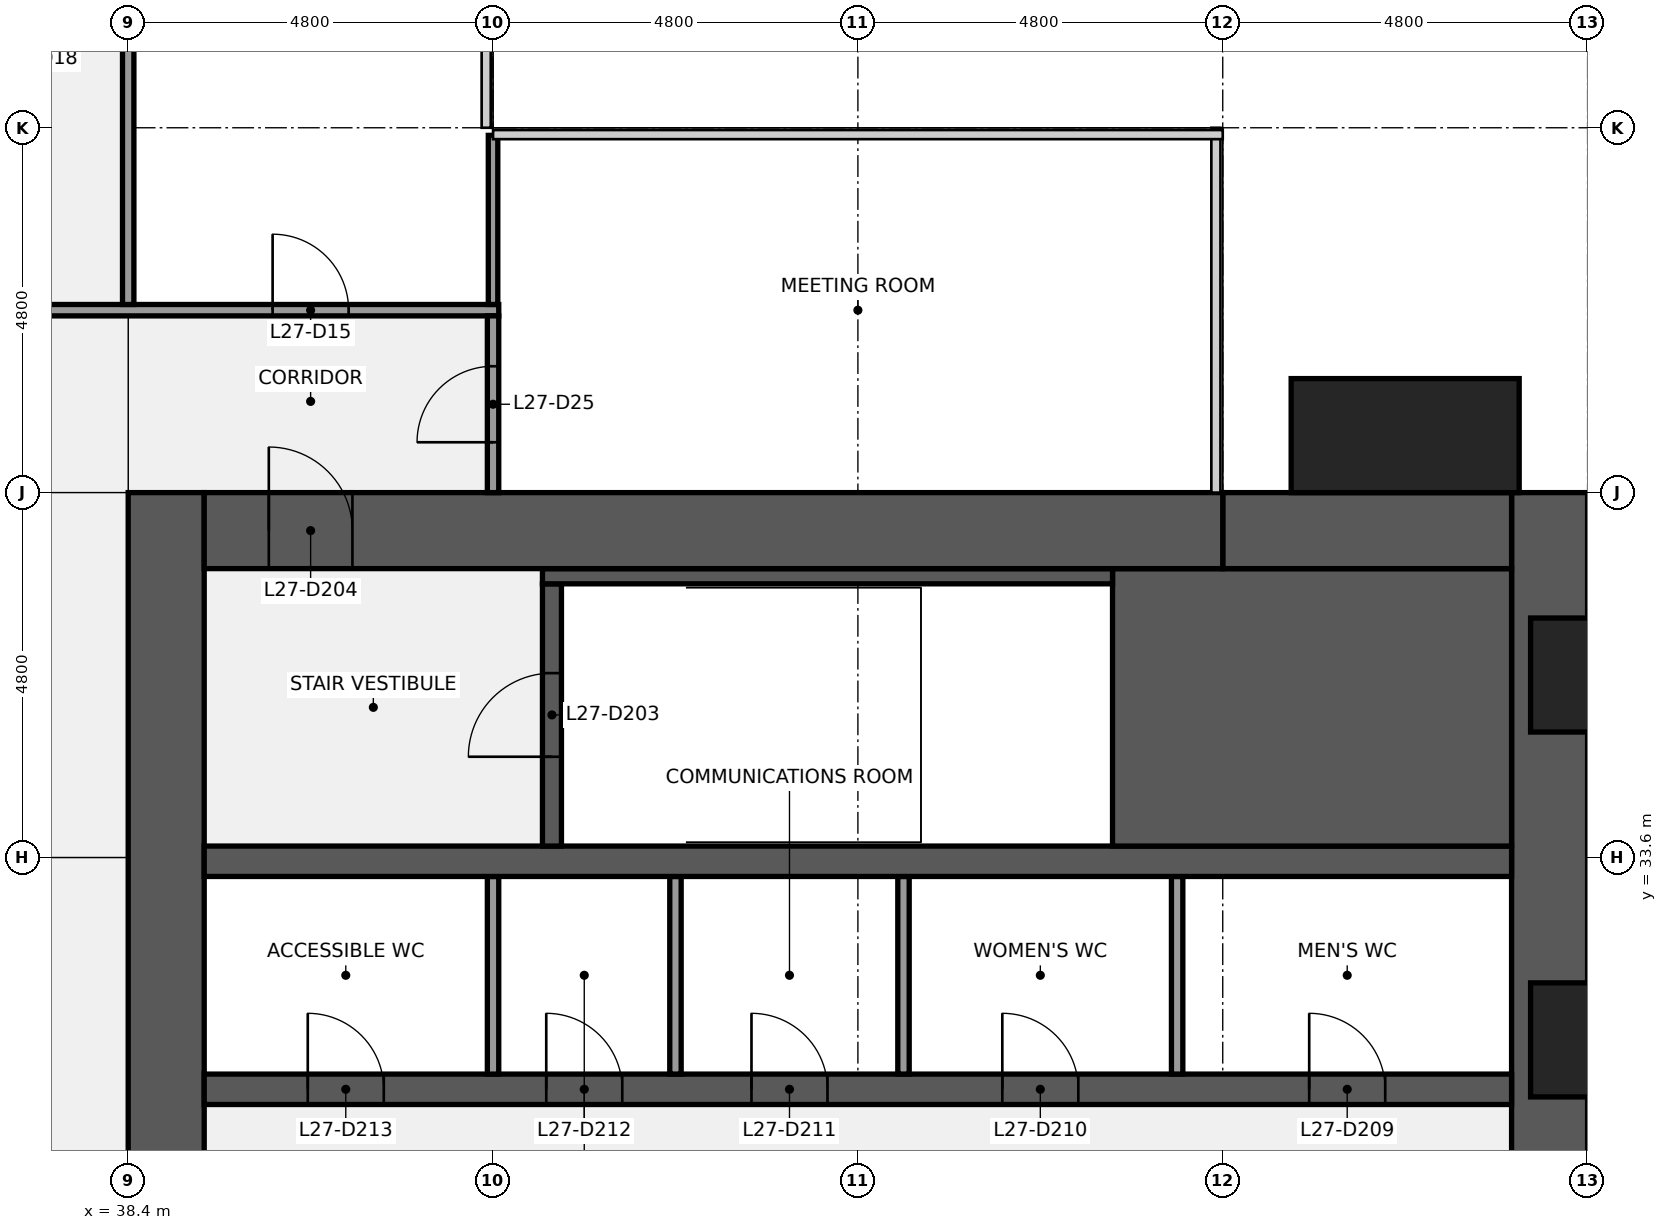
"""IFC4 building model, lengths in metres.
Left out: names, types, materials, properties, quantities, classifications, styles, units other than length and angle.
Written with IfcOpenShell. Run it as: python <this file> out.ifc"""

import sys

from ifc_helpers import new_model, si_unit, direction, frame, frame_2d, origin, origin_2d, place, context, subcontext, project, spatial, rectangle, extrude, element, fill, save


model = new_model("IFC4")
c1 = context("Model", 3, precision=1e-05, world=origin(), true_north=direction((0.0, 1.0)))
c2 = subcontext(c1, "Body", "Model", "MODEL_VIEW")
j1 = project(units=[si_unit("LENGTHUNIT", "METRE"), si_unit("PLANEANGLEUNIT", "RADIAN")], contexts=[c1])
p1 = place(None, origin())
s1 = spatial("IfcSite", under=j1, at=p1, CompositionType="ELEMENT")
p2 = place(p1, origin())
s2 = spatial("IfcBuilding", under=s1, at=p2, CompositionType="ELEMENT")
p3 = place(p2, frame((0.0, 0.0, 128.1)))
s3 = spatial("IfcBuildingStorey", under=s2, at=p3, CompositionType="ELEMENT", Elevation=128.1)
p4 = place(p3, frame((57.1, 38.4, 0.0), z_axis=(0.0, 0.0, 1.0), x_axis=(0.0, -1.0, 0.0)))
e1 = element("IfcWall", 1, at=p4, inside=s3, PredefinedType="SHEAR", context=c2, shape_type="SweptSolid", body=[
    extrude(rectangle(XDim=28.8, YDim=1.0, at=frame_2d((14.4, 0.0))), origin(), (0.0, 0.0, 1.0), 3.84),
])
p5 = place(p4, frame((18.45, 0.0, 0.9)))
e2 = element("IfcOpeningElement", 2, at=p5, cuts=e1, PredefinedType="OPENING", context=c2, shape_type="SweptSolid", body=[
    extrude(rectangle(XDim=1.5, YDim=1.5, at=frame_2d((0.75, 0.75))), frame((0.0, 0.51, 0.0), z_axis=(0.0, -1.0, 0.0), x_axis=(1.0, 0.0, 0.0)), (0.0, 0.0, 1.0), 1.02),
])
p6 = place(p4, frame((8.85, 0.0, 0.9)))
e3 = element("IfcOpeningElement", 3, at=p6, cuts=e1, PredefinedType="OPENING", context=c2, shape_type="SweptSolid", body=[
    extrude(rectangle(XDim=1.5, YDim=1.5, at=frame_2d((0.75, 0.75))), frame((0.0, 0.51, 0.0), z_axis=(0.0, -1.0, 0.0), x_axis=(1.0, 0.0, 0.0)), (0.0, 0.0, 1.0), 1.02),
])
p7 = place(p3, frame((38.9, 9.6, 0.0), z_axis=(0.0, 0.0, 1.0), x_axis=(0.0, 1.0, 0.0)))
e4 = element("IfcWall", 4, at=p7, inside=s3, PredefinedType="SHEAR", context=c2, shape_type="SweptSolid", body=[
    extrude(rectangle(XDim=28.8, YDim=1.0, at=frame_2d((14.4, 0.0))), origin(), (0.0, 0.0, 1.0), 3.84),
])
p8 = place(p7, frame((8.7, 0.0, 0.0)))
e5 = element("IfcOpeningElement", 5, at=p8, cuts=e4, PredefinedType="OPENING", context=c2, shape_type="SweptSolid", body=[
    extrude(rectangle(XDim=1.8, YDim=2.1, at=frame_2d((0.9, 1.05))), frame((0.0, 0.51, 0.0), z_axis=(0.0, -1.0, 0.0), x_axis=(1.0, 0.0, 0.0)), (0.0, 0.0, 1.0), 1.02),
])
p9 = place(p7, frame((18.3, 0.0, 0.0)))
e6 = element("IfcOpeningElement", 6, at=p9, cuts=e4, PredefinedType="OPENING", context=c2, shape_type="SweptSolid", body=[
    extrude(rectangle(XDim=1.8, YDim=2.1, at=frame_2d((0.9, 1.05))), frame((0.0, 0.51, 0.0), z_axis=(0.0, -1.0, 0.0), x_axis=(1.0, 0.0, 0.0)), (0.0, 0.0, 1.0), 1.02),
])
p10 = place(p3, frame((39.4, 30.55, 0.0), z_axis=(0.0, 0.0, 1.0), x_axis=(1.0, 0.0, 0.0)))
e7 = element("IfcWall", 7, at=p10, inside=s3, PredefinedType="SHEAR", context=c2, shape_type="SweptSolid", body=[
    extrude(rectangle(XDim=17.2, YDim=0.4, at=frame_2d((8.6, 0.0))), origin(), (0.0, 0.0, 1.0), 3.84),
])
p11 = place(p10, frame((14.538, 0.0, 0.0)))
e8 = element("IfcOpeningElement", 8, at=p11, cuts=e7, PredefinedType="OPENING", context=c2, shape_type="SweptSolid", body=[
    extrude(rectangle(XDim=1.0, YDim=2.1, at=frame_2d((0.5, 1.05))), frame((0.0, 0.21, 0.0), z_axis=(0.0, -1.0, 0.0), x_axis=(1.0, 0.0, 0.0)), (0.0, 0.0, 1.0), 0.42),
])
p12 = place(p10, frame((10.5, 0.0, 0.0)))
e9 = element("IfcOpeningElement", 9, at=p12, cuts=e7, PredefinedType="OPENING", context=c2, shape_type="SweptSolid", body=[
    extrude(rectangle(XDim=1.0, YDim=2.1, at=frame_2d((0.5, 1.05))), frame((0.0, 0.21, 0.0), z_axis=(0.0, -1.0, 0.0), x_axis=(1.0, 0.0, 0.0)), (0.0, 0.0, 1.0), 0.42),
])
p13 = place(p10, frame((7.2, 0.0, 0.0)))
e10 = element("IfcOpeningElement", 10, at=p13, cuts=e7, PredefinedType="OPENING", context=c2, shape_type="SweptSolid", body=[
    extrude(rectangle(XDim=1.0, YDim=2.1, at=frame_2d((0.5, 1.05))), frame((0.0, 0.21, 0.0), z_axis=(0.0, -1.0, 0.0), x_axis=(1.0, 0.0, 0.0)), (0.0, 0.0, 1.0), 0.42),
])
p14 = place(p10, frame((4.5, 0.0, 0.0)))
e11 = element("IfcOpeningElement", 11, at=p14, cuts=e7, PredefinedType="OPENING", context=c2, shape_type="SweptSolid", body=[
    extrude(rectangle(XDim=1.0, YDim=2.1, at=frame_2d((0.5, 1.05))), frame((0.0, 0.21, 0.0), z_axis=(0.0, -1.0, 0.0), x_axis=(1.0, 0.0, 0.0)), (0.0, 0.0, 1.0), 0.42),
])
p15 = place(p10, frame((1.363, 0.0, 0.0)))
e12 = element("IfcOpeningElement", 12, at=p15, cuts=e7, PredefinedType="OPENING", context=c2, shape_type="SweptSolid", body=[
    extrude(rectangle(XDim=1.0, YDim=2.1, at=frame_2d((0.5, 1.05))), frame((0.0, 0.21, 0.0), z_axis=(0.0, -1.0, 0.0), x_axis=(1.0, 0.0, 0.0)), (0.0, 0.0, 1.0), 0.42),
])
for number, where, z_axis, x_axis in (
    (13, (52.2, 30.75, 0.0), (0.0, 0.0, 1.0), (0.0, 1.0, 0.0)),
    (14, (48.6, 30.75, 0.0), (0.0, 0.0, 1.0), (0.0, 1.0, 0.0)),
    (15, (45.6, 30.75, 0.0), (0.0, 0.0, 1.0), (0.0, 1.0, 0.0)),
    (16, (43.2, 30.75, 0.0), (0.0, 0.0, 1.0), (0.0, 1.0, 0.0)),
):
    element("IfcWall", number, at=place(p3, frame(where, z_axis=z_axis, x_axis=x_axis)), inside=s3, PredefinedType="PARTITIONING", context=c2, shape_type="SweptSolid", body=[
        extrude(rectangle(XDim=2.6, YDim=0.15, at=frame_2d((1.3, 0.0))), origin(), (0.0, 0.0, 1.0), 3.84),
    ])
p16 = place(p3, frame((39.4, 33.55, 0.0), z_axis=(0.0, 0.0, 1.0), x_axis=(1.0, 0.0, 0.0)))
e17 = element("IfcWall", 17, at=p16, inside=s3, PredefinedType="SHEAR", context=c2, shape_type="SweptSolid", body=[
    extrude(rectangle(XDim=17.2, YDim=0.4, at=frame_2d((8.6, 0.0))), origin(), (0.0, 0.0, 1.0), 3.84),
])
p17 = place(p3, frame((51.35, 35.575, 0.0), z_axis=(0.0, 0.0, 1.0), x_axis=(1.0, 0.0, 0.0)))
e18 = element("IfcWall", 18, at=p17, inside=s3, PredefinedType="SHEAR", context=c2, shape_type="SweptSolid", body=[
    extrude(rectangle(XDim=5.25, YDim=3.65, at=frame_2d((2.625, 0.0))), origin(), (0.0, 0.0, 1.0), 3.84),
])
p18 = place(p3, frame((43.975, 33.75, 0.0), z_axis=(0.0, 0.0, 1.0), x_axis=(0.0, 1.0, 0.0)))
e19 = element("IfcWall", 19, at=p18, inside=s3, PredefinedType="SHEAR", context=c2, shape_type="SweptSolid", body=[
    extrude(rectangle(XDim=3.45, YDim=0.25, at=frame_2d((1.725, 0.0))), origin(), (0.0, 0.0, 1.0), 3.84),
])
p19 = place(p18, frame((1.175, 0.0, 0.0)))
e20 = element("IfcOpeningElement", 20, at=p19, cuts=e19, PredefinedType="OPENING", context=c2, shape_type="SweptSolid", body=[
    extrude(rectangle(XDim=1.1, YDim=2.1, at=frame_2d((0.55, 1.05))), frame((0.0, 0.135, 0.0), z_axis=(0.0, -1.0, 0.0), x_axis=(1.0, 0.0, 0.0)), (0.0, 0.0, 1.0), 0.27),
])
p20 = place(p3, frame((43.85, 37.3, 0.0), z_axis=(0.0, 0.0, 1.0), x_axis=(1.0, 0.0, 0.0)))
e21 = element("IfcWall", 21, at=p20, inside=s3, PredefinedType="SHEAR", context=c2, shape_type="SweptSolid", body=[
    extrude(rectangle(XDim=7.5, YDim=0.2, at=frame_2d((3.75, 0.0))), origin(), (0.0, 0.0, 1.0), 3.84),
])
p21 = place(p3, frame((52.8, 37.9, 0.0), z_axis=(0.0, 0.0, 1.0), x_axis=(1.0, 0.0, 0.0)))
e22 = element("IfcWall", 22, at=p21, inside=s3, PredefinedType="SHEAR", context=c2, shape_type="SweptSolid", body=[
    extrude(rectangle(XDim=3.8, YDim=1.0, at=frame_2d((1.9, 0.0))), origin(), (0.0, 0.0, 1.0), 3.84),
])
p22 = place(p3, frame((39.4, 37.9, 0.0), z_axis=(0.0, 0.0, 1.0), x_axis=(1.0, 0.0, 0.0)))
e23 = element("IfcWall", 23, at=p22, inside=s3, PredefinedType="SHEAR", context=c2, shape_type="SweptSolid", body=[
    extrude(rectangle(XDim=13.4, YDim=1.0, at=frame_2d((6.7, 0.0))), origin(), (0.0, 0.0, 1.0), 3.84),
])
p23 = place(p22, frame((0.85, 0.0, 0.0)))
e24 = element("IfcOpeningElement", 24, at=p23, cuts=e23, PredefinedType="OPENING", context=c2, shape_type="SweptSolid", body=[
    extrude(rectangle(XDim=1.1, YDim=2.1, at=frame_2d((0.55, 1.05))), frame((0.0, 0.51, 0.0), z_axis=(0.0, -1.0, 0.0), x_axis=(1.0, 0.0, 0.0)), (0.0, 0.0, 1.0), 1.02),
])
p24 = place(p3, frame((14.325, 40.8, 0.0), z_axis=(0.0, 0.0, 1.0), x_axis=(1.0, 0.0, 0.0)))
e25 = element("IfcWall", 25, at=p24, inside=s3, PredefinedType="PARTITIONING", context=c2, shape_type="SweptSolid", body=[
    extrude(rectangle(XDim=28.95, YDim=0.15, at=frame_2d((14.475, 0.0))), origin(), (0.0, 0.0, 1.0), 2.936),
])
p25 = place(p24, frame((1.975, 0.0, 0.0)))
e26 = element("IfcOpeningElement", 26, at=p25, cuts=e25, PredefinedType="OPENING", context=c2, shape_type="SweptSolid", body=[
    extrude(rectangle(XDim=1.0, YDim=2.1, at=frame_2d((0.5, 1.05))), frame((0.0, 0.085, 0.0), z_axis=(0.0, -1.0, 0.0), x_axis=(1.0, 0.0, 0.0)), (0.0, 0.0, 1.0), 0.17),
])
p26 = place(p24, frame((5.575, 0.0, 0.0)))
e27 = element("IfcOpeningElement", 27, at=p26, cuts=e25, PredefinedType="OPENING", context=c2, shape_type="SweptSolid", body=[
    extrude(rectangle(XDim=1.0, YDim=2.1, at=frame_2d((0.5, 1.05))), frame((0.0, 0.085, 0.0), z_axis=(0.0, -1.0, 0.0), x_axis=(1.0, 0.0, 0.0)), (0.0, 0.0, 1.0), 0.17),
])
p27 = place(p24, frame((9.175, 0.0, 0.0)))
e28 = element("IfcOpeningElement", 28, at=p27, cuts=e25, PredefinedType="OPENING", context=c2, shape_type="SweptSolid", body=[
    extrude(rectangle(XDim=1.0, YDim=2.1, at=frame_2d((0.5, 1.05))), frame((0.0, 0.085, 0.0), z_axis=(0.0, -1.0, 0.0), x_axis=(1.0, 0.0, 0.0)), (0.0, 0.0, 1.0), 0.17),
])
p28 = place(p24, frame((12.775, 0.0, 0.0)))
e29 = element("IfcOpeningElement", 29, at=p28, cuts=e25, PredefinedType="OPENING", context=c2, shape_type="SweptSolid", body=[
    extrude(rectangle(XDim=1.0, YDim=2.1, at=frame_2d((0.5, 1.05))), frame((0.0, 0.085, 0.0), z_axis=(0.0, -1.0, 0.0), x_axis=(1.0, 0.0, 0.0)), (0.0, 0.0, 1.0), 0.17),
])
p29 = place(p24, frame((15.175, 0.0, 0.0)))
e30 = element("IfcOpeningElement", 30, at=p29, cuts=e25, PredefinedType="OPENING", context=c2, shape_type="SweptSolid", body=[
    extrude(rectangle(XDim=1.0, YDim=2.1, at=frame_2d((0.5, 1.05))), frame((0.0, 0.085, 0.0), z_axis=(0.0, -1.0, 0.0), x_axis=(1.0, 0.0, 0.0)), (0.0, 0.0, 1.0), 0.17),
])
p30 = place(p24, frame((19.975, 0.0, 0.0)))
e31 = element("IfcOpeningElement", 31, at=p30, cuts=e25, PredefinedType="OPENING", context=c2, shape_type="SweptSolid", body=[
    extrude(rectangle(XDim=1.0, YDim=2.1, at=frame_2d((0.5, 1.05))), frame((0.0, 0.085, 0.0), z_axis=(0.0, -1.0, 0.0), x_axis=(1.0, 0.0, 0.0)), (0.0, 0.0, 1.0), 0.17),
])
p31 = place(p24, frame((25.975, 0.0, 0.0)))
e32 = element("IfcOpeningElement", 32, at=p31, cuts=e25, PredefinedType="OPENING", context=c2, shape_type="SweptSolid", body=[
    extrude(rectangle(XDim=1.0, YDim=2.1, at=frame_2d((0.5, 1.05))), frame((0.0, 0.085, 0.0), z_axis=(0.0, -1.0, 0.0), x_axis=(1.0, 0.0, 0.0)), (0.0, 0.0, 1.0), 0.17),
])
p32 = place(p3, frame((38.4, 40.875, 0.0), z_axis=(0.0, 0.0, 1.0), x_axis=(0.0, 1.0, 0.0)))
e33 = element("IfcWall", 33, at=p32, inside=s3, PredefinedType="PARTITIONING", context=c2, shape_type="SweptSolid", body=[
    extrude(rectangle(XDim=3.45, YDim=0.15, at=frame_2d((1.725, 0.0))), origin(), (0.0, 0.0, 1.0), 2.936),
])
p33 = place(p3, frame((43.2, 40.875, 0.0), z_axis=(0.0, 0.0, 1.0), x_axis=(0.0, 1.0, 0.0)))
e34 = element("IfcWall", 34, at=p33, inside=s3, PredefinedType="PARTITIONING", context=c2, shape_type="SweptSolid", body=[
    extrude(rectangle(XDim=2.225, YDim=0.125, at=frame_2d((1.113, 0.0))), origin(), (0.0, 0.0, 1.0), 2.936),
])
p34 = place(p3, frame((43.2, 38.4, 0.0), z_axis=(0.0, 0.0, 1.0), x_axis=(0.0, 1.0, 0.0)))
e35 = element("IfcWall", 35, at=p34, inside=s3, PredefinedType="PARTITIONING", context=c2, shape_type="SweptSolid", body=[
    extrude(rectangle(XDim=2.325, YDim=0.15, at=frame_2d((1.163, 0.0))), origin(), (0.0, 0.0, 1.0), 2.936),
])
p35 = place(p34, frame((0.663, 0.0, 0.0)))
e36 = element("IfcOpeningElement", 36, at=p35, cuts=e35, PredefinedType="OPENING", context=c2, shape_type="SweptSolid", body=[
    extrude(rectangle(XDim=1.0, YDim=2.1, at=frame_2d((0.5, 1.05))), frame((0.0, 0.085, 0.0), z_axis=(0.0, -1.0, 0.0), x_axis=(1.0, 0.0, 0.0)), (0.0, 0.0, 1.0), 0.17),
])
p36 = place(p3, frame((55.2, 39.15, 0.0), z_axis=(0.0, 0.0, 1.0), x_axis=(1.0, 0.0, 0.0)))
e37 = element("IfcColumn", 37, at=p36, inside=s3, PredefinedType="PILASTER", context=c2, shape_type="SweptSolid", body=[
    extrude(rectangle(XDim=3.0, YDim=1.5, at=origin_2d()), origin(), (0.0, 0.0, 1.0), 4.0),
])
p37 = place(p19, origin())
e38 = element("IfcDoor", 38, at=p37, inside=s3, OperationType="SINGLE_SWING_LEFT", PredefinedType="DOOR", context=c2, shape_type="SweptSolid", body=[
    extrude(rectangle(XDim=1.1, YDim=2.1, at=frame_2d((0.55, 1.05))), frame((0.0, 0.025, 0.0), z_axis=(0.0, -1.0, 0.0), x_axis=(1.0, 0.0, 0.0)), (0.0, 0.0, 1.0), 0.05),
])
fill(e20, e38)
p38 = place(p23, origin())
e39 = element("IfcDoor", 39, at=p38, inside=s3, OperationType="SINGLE_SWING_LEFT", PredefinedType="DOOR", context=c2, shape_type="SweptSolid", body=[
    extrude(rectangle(XDim=1.1, YDim=2.1, at=frame_2d((0.55, 1.05))), frame((0.0, 0.025, 0.0), z_axis=(0.0, -1.0, 0.0), x_axis=(1.0, 0.0, 0.0)), (0.0, 0.0, 1.0), 0.05),
])
fill(e24, e39)
p39 = place(p11, origin())
e40 = element("IfcDoor", 40, at=p39, inside=s3, OperationType="SINGLE_SWING_LEFT", PredefinedType="DOOR", context=c2, shape_type="SweptSolid", body=[
    extrude(rectangle(XDim=1.0, YDim=2.1, at=frame_2d((0.5, 1.05))), frame((0.0, 0.025, 0.0), z_axis=(0.0, -1.0, 0.0), x_axis=(1.0, 0.0, 0.0)), (0.0, 0.0, 1.0), 0.05),
])
fill(e8, e40)
p40 = place(p12, origin())
e41 = element("IfcDoor", 41, at=p40, inside=s3, OperationType="SINGLE_SWING_LEFT", PredefinedType="DOOR", context=c2, shape_type="SweptSolid", body=[
    extrude(rectangle(XDim=1.0, YDim=2.1, at=frame_2d((0.5, 1.05))), frame((0.0, 0.025, 0.0), z_axis=(0.0, -1.0, 0.0), x_axis=(1.0, 0.0, 0.0)), (0.0, 0.0, 1.0), 0.05),
])
fill(e9, e41)
p41 = place(p13, origin())
e42 = element("IfcDoor", 42, at=p41, inside=s3, OperationType="SINGLE_SWING_LEFT", PredefinedType="DOOR", context=c2, shape_type="SweptSolid", body=[
    extrude(rectangle(XDim=1.0, YDim=2.1, at=frame_2d((0.5, 1.05))), frame((0.0, 0.025, 0.0), z_axis=(0.0, -1.0, 0.0), x_axis=(1.0, 0.0, 0.0)), (0.0, 0.0, 1.0), 0.05),
])
fill(e10, e42)
p42 = place(p14, origin())
e43 = element("IfcDoor", 43, at=p42, inside=s3, OperationType="SINGLE_SWING_LEFT", PredefinedType="DOOR", context=c2, shape_type="SweptSolid", body=[
    extrude(rectangle(XDim=1.0, YDim=2.1, at=frame_2d((0.5, 1.05))), frame((0.0, 0.025, 0.0), z_axis=(0.0, -1.0, 0.0), x_axis=(1.0, 0.0, 0.0)), (0.0, 0.0, 1.0), 0.05),
])
fill(e11, e43)
p43 = place(p15, origin())
e44 = element("IfcDoor", 44, at=p43, inside=s3, OperationType="SINGLE_SWING_LEFT", PredefinedType="DOOR", context=c2, shape_type="SweptSolid", body=[
    extrude(rectangle(XDim=1.0, YDim=2.1, at=frame_2d((0.5, 1.05))), frame((0.0, 0.025, 0.0), z_axis=(0.0, -1.0, 0.0), x_axis=(1.0, 0.0, 0.0)), (0.0, 0.0, 1.0), 0.05),
])
fill(e12, e44)
p44 = place(p31, origin())
e45 = element("IfcDoor", 45, at=p44, inside=s3, OperationType="SINGLE_SWING_LEFT", PredefinedType="DOOR", context=c2, shape_type="SweptSolid", body=[
    extrude(rectangle(XDim=1.0, YDim=2.1, at=frame_2d((0.5, 1.05))), frame((0.0, 0.025, 0.0), z_axis=(0.0, -1.0, 0.0), x_axis=(1.0, 0.0, 0.0)), (0.0, 0.0, 1.0), 0.05),
])
fill(e32, e45)
p45 = place(p35, origin())
e46 = element("IfcDoor", 46, at=p45, inside=s3, OperationType="SINGLE_SWING_LEFT", PredefinedType="DOOR", context=c2, shape_type="SweptSolid", body=[
    extrude(rectangle(XDim=1.0, YDim=2.1, at=frame_2d((0.5, 1.05))), frame((0.0, 0.025, 0.0), z_axis=(0.0, -1.0, 0.0), x_axis=(1.0, 0.0, 0.0)), (0.0, 0.0, 1.0), 0.05),
])
fill(e36, e46)
save(model, sys.argv[1])
